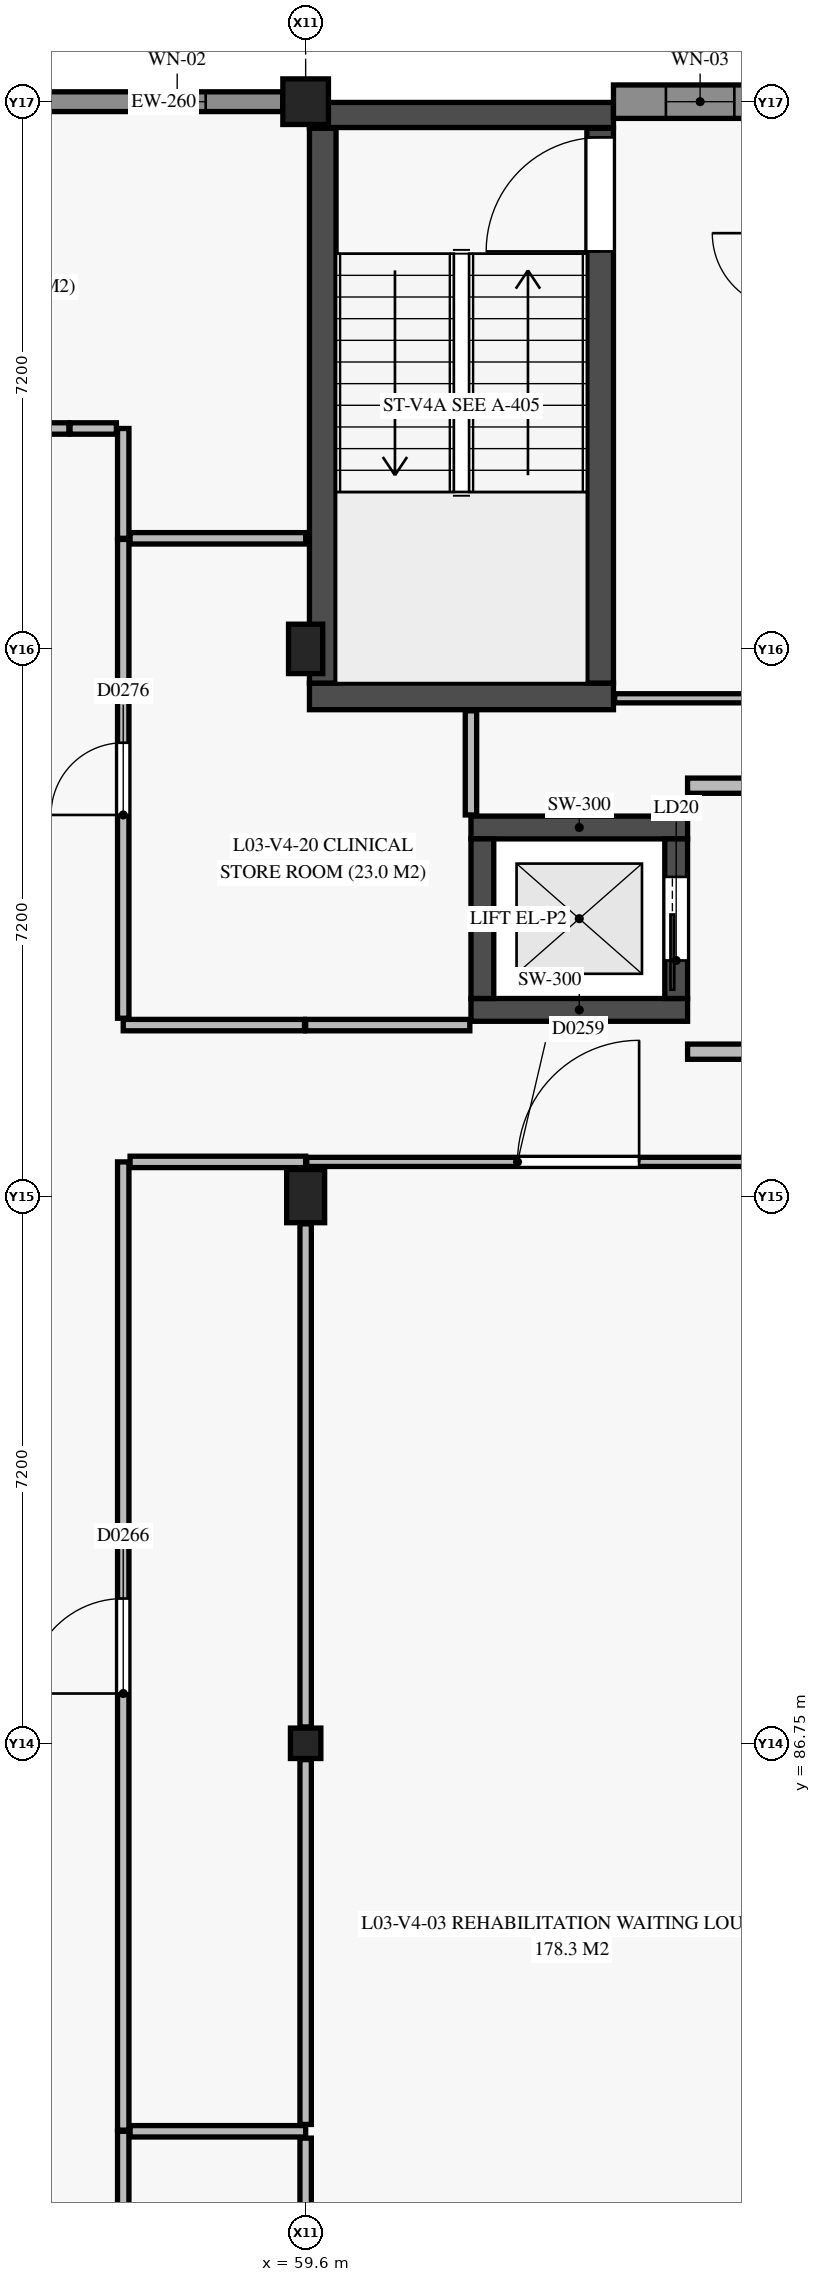
"""IFC4 building model, lengths in metres.
Left out: names, types, materials, properties, quantities, classifications, styles, units other than length and angle.
Written with IfcOpenShell. Run it as: python <this file> out.ifc"""

import sys

from ifc_helpers import new_model, si_unit, direction, frame, frame_2d, origin, origin_2d, place, context, subcontext, project, spatial, rectangle, circle, extrude, element, fill, save


model = new_model("IFC4")
c1 = context("Model", 3, precision=1e-05, world=origin(), true_north=direction((0.0, 1.0)))
c2 = subcontext(c1, "Body", "Model", "MODEL_VIEW")
j1 = project(units=[si_unit("LENGTHUNIT", "METRE"), si_unit("PLANEANGLEUNIT", "RADIAN")], contexts=[c1])
p1 = place(None, origin())
s1 = spatial("IfcSite", under=j1, at=p1, CompositionType="ELEMENT")
p2 = place(p1, origin())
s2 = spatial("IfcBuilding", under=s1, at=p2, CompositionType="ELEMENT")
p3 = place(p2, frame((0.0, 0.0, 13.2)))
s3 = spatial("IfcBuildingStorey", under=s2, at=p3, CompositionType="ELEMENT", Elevation=13.2)
p4 = place(p3, frame((59.6, 86.75, 0.0), z_axis=(0.0, 0.0, 1.0), x_axis=(1.0, 0.0, 0.0)))
e1 = element("IfcColumn", 1, at=p4, inside=s3, PredefinedType="COLUMN", context=c2, shape_type="SweptSolid", body=[
    extrude(rectangle(XDim=0.4, YDim=0.4, at=origin_2d()), origin(), (0.0, 0.0, 1.0), 4.05),
])
p5 = place(p3, frame((59.6, 93.95, 0.0), z_axis=(0.0, 0.0, 1.0), x_axis=(1.0, 0.0, 0.0)))
e2 = element("IfcColumn", 2, at=p5, inside=s3, PredefinedType="COLUMN", context=c2, shape_type="SweptSolid", body=[
    extrude(rectangle(XDim=0.5, YDim=0.7, at=origin_2d()), origin(), (0.0, 0.0, 1.0), 4.2),
])
p6 = place(p3, frame((59.6, 101.15, 0.0), z_axis=(0.0, 0.0, 1.0), x_axis=(1.0, 0.0, 0.0)))
e3 = element("IfcColumn", 3, at=p6, inside=s3, PredefinedType="COLUMN", context=c2, shape_type="SweptSolid", body=[
    extrude(rectangle(XDim=0.45, YDim=0.65, at=origin_2d()), origin(), (0.0, 0.0, 1.0), 4.2),
])
p7 = place(p3, frame((59.6, 108.35, 0.0), z_axis=(0.0, 0.0, 1.0), x_axis=(1.0, 0.0, 0.0)))
e4 = element("IfcColumn", 4, at=p7, inside=s3, PredefinedType="COLUMN", context=c2, shape_type="SweptSolid", body=[
    extrude(circle(Radius=0.3, at=origin_2d()), origin(), (0.0, 0.0, 1.0), 4.2),
])
p8 = place(p3, frame((59.65, 100.525, 0.0), z_axis=(0.0, 0.0, 1.0), x_axis=(1.0, 0.0, 0.0)))
e5 = element("IfcWall", 5, at=p8, inside=s3, PredefinedType="SHEAR", context=c2, shape_type="SweptSolid", body=[
    extrude(rectangle(XDim=4.0, YDim=0.35, at=frame_2d((2.0, 0.0))), origin(), (0.0, 0.0, 1.0), 3.95),
])
p9 = place(p3, frame((59.65, 108.175, 0.0), z_axis=(0.0, 0.0, 1.0), x_axis=(1.0, 0.0, 0.0)))
e6 = element("IfcWall", 6, at=p9, inside=s3, PredefinedType="SHEAR", context=c2, shape_type="SweptSolid", body=[
    extrude(rectangle(XDim=4.0, YDim=0.33, at=frame_2d((2.0, 0.0))), origin(), (0.0, 0.0, 1.0), 3.95),
])
p10 = place(p3, frame((59.825, 100.7, 0.0), z_axis=(0.0, 0.0, 1.0), x_axis=(0.0, 1.0, 0.0)))
e7 = element("IfcWall", 7, at=p10, inside=s3, PredefinedType="SHEAR", context=c2, shape_type="SweptSolid", body=[
    extrude(rectangle(XDim=7.3, YDim=0.35, at=frame_2d((3.65, 0.0))), origin(), (0.0, 0.0, 1.0), 3.95),
])
p11 = place(p3, frame((63.475, 100.7, 0.0), z_axis=(0.0, 0.0, 1.0), x_axis=(0.0, 1.0, 0.0)))
e8 = element("IfcWall", 8, at=p11, inside=s3, PredefinedType="SHEAR", context=c2, shape_type="SweptSolid", body=[
    extrude(rectangle(XDim=7.3, YDim=0.35, at=frame_2d((3.65, 0.0))), origin(), (0.0, 0.0, 1.0), 3.95),
])
p12 = place(p11, frame((5.68, 0.0, 0.0)))
e9 = element("IfcOpeningElement", 9, at=p12, cuts=e8, PredefinedType="OPENING", context=c2, shape_type="SweptSolid", body=[
    extrude(rectangle(XDim=1.5, YDim=2.15, at=frame_2d((0.75, 1.075))), frame((0.0, 0.185, 0.0), z_axis=(0.0, -1.0, 0.0), x_axis=(1.0, 0.0, 0.0)), (0.0, 0.0, 1.0), 0.37),
])
for number, where, z_axis, x_axis in (
    (10, (61.775, 96.4, 0.0), (0.0, 0.0, 1.0), (1.0, 0.0, 0.0)),
    (11, (61.775, 98.8, 0.0), (0.0, 0.0, 1.0), (1.0, 0.0, 0.0)),
):
    element("IfcWall", number, at=place(p3, frame(where, z_axis=z_axis, x_axis=x_axis)), inside=s3, PredefinedType="SHEAR", context=c2, shape_type="SweptSolid", body=[
        extrude(rectangle(XDim=2.85, YDim=0.3, at=frame_2d((1.425, 0.0))), origin(), (0.0, 0.0, 1.0), 3.95),
    ])
p13 = place(p3, frame((61.925, 96.55, 0.0), z_axis=(0.0, 0.0, 1.0), x_axis=(0.0, 1.0, 0.0)))
e12 = element("IfcWall", 12, at=p13, inside=s3, PredefinedType="SHEAR", context=c2, shape_type="SweptSolid", body=[
    extrude(rectangle(XDim=2.1, YDim=0.3, at=frame_2d((1.05, 0.0))), origin(), (0.0, 0.0, 1.0), 3.95),
])
p14 = place(p3, frame((64.475, 96.55, 0.0), z_axis=(0.0, 0.0, 1.0), x_axis=(0.0, 1.0, 0.0)))
e13 = element("IfcWall", 13, at=p14, inside=s3, PredefinedType="SHEAR", context=c2, shape_type="SweptSolid", body=[
    extrude(rectangle(XDim=2.1, YDim=0.3, at=frame_2d((1.05, 0.0))), origin(), (0.0, 0.0, 1.0), 3.95),
])
p15 = place(p14, frame((0.5, 0.0, 0.0)))
e14 = element("IfcOpeningElement", 14, at=p15, cuts=e13, PredefinedType="OPENING", context=c2, shape_type="SweptSolid", body=[
    extrude(rectangle(XDim=1.1, YDim=2.15, at=frame_2d((0.55, 1.075))), frame((0.0, 0.16, 0.0), z_axis=(0.0, -1.0, 0.0), x_axis=(1.0, 0.0, 0.0)), (0.0, 0.0, 1.0), 0.32),
])
p16 = place(p3, frame((56.17, 108.35, 0.0), z_axis=(0.0, 0.0, 1.0), x_axis=(1.0, 0.0, 0.0)))
e15 = element("IfcWall", 15, at=p16, inside=s3, PredefinedType="SOLIDWALL", context=c2, shape_type="SweptSolid", body=[
    extrude(rectangle(XDim=3.13, YDim=0.26, at=frame_2d((1.565, 0.0))), origin(), (0.0, 0.0, 1.0), 3.13),
])
p17 = place(p16, frame((1.365, 0.0, 0.9)))
e16 = element("IfcOpeningElement", 16, at=p17, cuts=e15, PredefinedType="OPENING", context=c2, shape_type="SweptSolid", body=[
    extrude(rectangle(XDim=0.75, YDim=1.8, at=frame_2d((0.375, 0.9))), frame((0.0, 0.14, 0.0), z_axis=(0.0, -1.0, 0.0), x_axis=(1.0, 0.0, 0.0)), (0.0, 0.0, 1.0), 0.28),
])
p18 = place(p3, frame((63.65, 108.35, 0.0), z_axis=(0.0, 0.0, 1.0), x_axis=(1.0, 0.0, 0.0)))
e17 = element("IfcWall", 17, at=p18, inside=s3, PredefinedType="USERDEFINED", context=c2, shape_type="SweptSolid", body=[
    extrude(rectangle(XDim=2.875, YDim=0.44, at=frame_2d((1.438, 0.0))), origin(), (0.0, 0.0, 1.0), 3.13),
])
p19 = place(p18, frame((0.69, 0.0, 0.9)))
e18 = element("IfcOpeningElement", 18, at=p19, cuts=e17, PredefinedType="OPENING", context=c2, shape_type="SweptSolid", body=[
    extrude(rectangle(XDim=0.9, YDim=1.8, at=frame_2d((0.45, 0.9))), frame((0.0, 0.23, 0.0), z_axis=(0.0, -1.0, 0.0), x_axis=(1.0, 0.0, 0.0)), (0.0, 0.0, 1.0), 0.46),
])
for number, where, z_axis, x_axis in (
    (19, (64.625, 95.85, 0.0), (0.0, 0.0, 1.0), (1.0, 0.0, 0.0)),
    (20, (64.625, 99.35, 0.0), (0.0, 0.0, 1.0), (1.0, 0.0, 0.0)),
):
    element("IfcWall", number, at=place(p3, frame(where, z_axis=z_axis, x_axis=x_axis)), inside=s3, PredefinedType="PARTITIONING", context=c2, shape_type="SweptSolid", body=[
        extrude(rectangle(XDim=3.285, YDim=0.2, at=frame_2d((1.643, 0.0))), origin(), (0.0, 0.0, 1.0), 3.235),
    ])
p20 = place(p3, frame((57.2, 70.2, 0.0), z_axis=(0.0, 0.0, 1.0), x_axis=(0.0, 1.0, 0.0)))
e21 = element("IfcWall", 21, at=p20, inside=s3, PredefinedType="PARTITIONING", context=c2, shape_type="SweptSolid", body=[
    extrude(rectangle(XDim=11.445, YDim=0.15, at=frame_2d((5.723, 0.0))), origin(), (0.0, 0.0, 1.0), 3.48),
])
p21 = place(p20, frame((5.248, 0.0, 0.0)))
e22 = element("IfcOpeningElement", 22, at=p21, cuts=e21, PredefinedType="OPENING", context=c2, shape_type="SweptSolid", body=[
    extrude(rectangle(XDim=0.95, YDim=2.1, at=frame_2d((0.475, 1.05))), frame((0.0, 0.085, 0.0), z_axis=(0.0, -1.0, 0.0), x_axis=(1.0, 0.0, 0.0)), (0.0, 0.0, 1.0), 0.17),
])
p22 = place(p3, frame((57.2, 81.66, 0.0), z_axis=(0.0, 0.0, 1.0), x_axis=(0.0, 1.0, 0.0)))
e23 = element("IfcWall", 23, at=p22, inside=s3, PredefinedType="PARTITIONING", context=c2, shape_type="SweptSolid", body=[
    extrude(rectangle(XDim=12.74, YDim=0.15, at=frame_2d((6.37, 0.0))), origin(), (0.0, 0.0, 1.0), 3.48),
])
p23 = place(p22, frame((5.745, 0.0, 0.0)))
e24 = element("IfcOpeningElement", 24, at=p23, cuts=e23, PredefinedType="OPENING", context=c2, shape_type="SweptSolid", body=[
    extrude(rectangle(XDim=1.25, YDim=2.15, at=frame_2d((0.625, 1.075))), frame((0.0, 0.085, 0.0), z_axis=(0.0, -1.0, 0.0), x_axis=(1.0, 0.0, 0.0)), (0.0, 0.0, 1.0), 0.17),
])
p24 = place(p3, frame((57.29, 94.4, 0.0), z_axis=(0.0, 0.0, 1.0), x_axis=(1.0, 0.0, 0.0)))
e25 = element("IfcWall", 25, at=p24, inside=s3, PredefinedType="PARTITIONING", context=c2, shape_type="SweptSolid", body=[
    extrude(rectangle(XDim=2.31, YDim=0.15, at=frame_2d((1.155, 0.0))), origin(), (0.0, 0.0, 1.0), 3.135),
])
p25 = place(p3, frame((57.2, 102.605, 0.0), z_axis=(0.0, 0.0, 1.0), x_axis=(0.0, 1.0, 0.0)))
e26 = element("IfcWall", 26, at=p25, inside=s3, PredefinedType="PARTITIONING", context=c2, shape_type="SweptSolid", body=[
    extrude(rectangle(XDim=1.445, YDim=0.15, at=frame_2d((0.723, 0.0))), origin(), (0.0, 0.0, 1.0), 3.95),
])
p26 = place(p3, frame((56.5, 104.05, 0.0), z_axis=(0.0, 0.0, 1.0), x_axis=(1.0, 0.0, 0.0)))
e27 = element("IfcWall", 27, at=p26, inside=s3, PredefinedType="PARTITIONING", context=c2, shape_type="SweptSolid", body=[
    extrude(rectangle(XDim=0.61, YDim=0.15, at=frame_2d((0.305, 0.0))), origin(), (0.0, 0.0, 1.0), 3.95),
])
p27 = place(p3, frame((54.8, 104.05, 0.0), z_axis=(0.0, 0.0, 1.0), x_axis=(1.0, 0.0, 0.0)))
e28 = element("IfcWall", 28, at=p27, inside=s3, PredefinedType="PARTITIONING", context=c2, shape_type="SweptSolid", body=[
    extrude(rectangle(XDim=1.685, YDim=0.15, at=frame_2d((0.843, 0.0))), origin(), (0.0, 0.0, 1.0), 3.515),
])
p28 = place(p3, frame((59.6, 96.2, 0.0), z_axis=(0.0, 0.0, 1.0), x_axis=(1.0, 0.0, 0.0)))
e29 = element("IfcWall", 29, at=p28, inside=s3, PredefinedType="PARTITIONING", context=c2, shape_type="SweptSolid", body=[
    extrude(rectangle(XDim=2.16, YDim=0.15, at=frame_2d((1.08, 0.0))), origin(), (0.0, 0.0, 1.0), 3.135),
])
p29 = place(p3, frame((57.2, 96.2, 0.0), z_axis=(0.0, 0.0, 1.0), x_axis=(1.0, 0.0, 0.0)))
e30 = element("IfcWall", 30, at=p29, inside=s3, PredefinedType="PARTITIONING", context=c2, shape_type="SweptSolid", body=[
    extrude(rectangle(XDim=2.385, YDim=0.15, at=frame_2d((1.192, 0.0))), origin(), (0.0, 0.0, 1.0), 3.135),
])
p30 = place(p3, frame((57.2, 96.29, 0.0), z_axis=(0.0, 0.0, 1.0), x_axis=(0.0, 1.0, 0.0)))
e31 = element("IfcWall", 31, at=p30, inside=s3, PredefinedType="PARTITIONING", context=c2, shape_type="SweptSolid", body=[
    extrude(rectangle(XDim=6.3, YDim=0.15, at=frame_2d((3.15, 0.0))), origin(), (0.0, 0.0, 1.0), 3.355),
])
p31 = place(p30, frame((2.675, 0.0, 0.0)))
e32 = element("IfcOpeningElement", 32, at=p31, cuts=e31, PredefinedType="OPENING", context=c2, shape_type="SweptSolid", body=[
    extrude(rectangle(XDim=0.95, YDim=2.1, at=frame_2d((0.475, 1.05))), frame((0.0, 0.085, 0.0), z_axis=(0.0, -1.0, 0.0), x_axis=(1.0, 0.0, 0.0)), (0.0, 0.0, 1.0), 0.17),
])
p32 = place(p3, frame((59.615, 94.4, 0.0), z_axis=(0.0, 0.0, 1.0), x_axis=(1.0, 0.0, 0.0)))
e33 = element("IfcWall", 33, at=p32, inside=s3, PredefinedType="PARTITIONING", context=c2, shape_type="SweptSolid", body=[
    extrude(rectangle(XDim=7.145, YDim=0.12, at=frame_2d((3.573, 0.0))), origin(), (0.0, 0.0, 1.0), 3.135),
])
p33 = place(p32, frame((2.772, 0.0, 0.0)))
e34 = element("IfcOpeningElement", 34, at=p33, cuts=e33, PredefinedType="OPENING", context=c2, shape_type="SweptSolid", body=[
    extrude(rectangle(XDim=1.6, YDim=2.25, at=frame_2d((0.8, 1.125))), frame((0.0, 0.07, 0.0), z_axis=(0.0, -1.0, 0.0), x_axis=(1.0, 0.0, 0.0)), (0.0, 0.0, 1.0), 0.14),
])
p34 = place(p3, frame((63.665, 100.5, 0.0), z_axis=(0.0, 0.0, 1.0), x_axis=(1.0, 0.0, 0.0)))
e35 = element("IfcWall", 35, at=p34, inside=s3, PredefinedType="PARTITIONING", context=c2, shape_type="SweptSolid", body=[
    extrude(rectangle(XDim=2.285, YDim=0.12, at=frame_2d((1.143, 0.0))), origin(), (0.0, 0.0, 1.0), 3.95),
])
p35 = place(p3, frame((57.29, 81.645, 0.0), z_axis=(0.0, 0.0, 1.0), x_axis=(1.0, 0.0, 0.0)))
e36 = element("IfcWall", 36, at=p35, inside=s3, PredefinedType="PARTITIONING", context=c2, shape_type="SweptSolid", body=[
    extrude(rectangle(XDim=2.31, YDim=0.15, at=frame_2d((1.155, 0.0))), origin(), (0.0, 0.0, 1.0), 3.95),
])
p36 = place(p3, frame((59.6, 79.79, 0.0), z_axis=(0.0, 0.0, 1.0), x_axis=(0.0, 1.0, 0.0)))
e37 = element("IfcWall", 37, at=p36, inside=s3, PredefinedType="PARTITIONING", context=c2, shape_type="SweptSolid", body=[
    extrude(rectangle(XDim=1.765, YDim=0.15, at=frame_2d((0.882, 0.0))), origin(), (0.0, 0.0, 1.0), 3.95),
])
p37 = place(p3, frame((59.6, 81.735, 0.0), z_axis=(0.0, 0.0, 1.0), x_axis=(0.0, 1.0, 0.0)))
e38 = element("IfcWall", 38, at=p37, inside=s3, PredefinedType="PARTITIONING", context=c2, shape_type="SweptSolid", body=[
    extrude(rectangle(XDim=4.8, YDim=0.15, at=frame_2d((2.4, 0.0))), origin(), (0.0, 0.0, 1.0), 3.95),
])
p38 = place(p3, frame((59.6, 86.965, 0.0), z_axis=(0.0, 0.0, 1.0), x_axis=(0.0, 1.0, 0.0)))
e39 = element("IfcWall", 39, at=p38, inside=s3, PredefinedType="PARTITIONING", context=c2, shape_type="SweptSolid", body=[
    extrude(rectangle(XDim=6.62, YDim=0.15, at=frame_2d((3.31, 0.0))), origin(), (0.0, 0.0, 1.0), 3.95),
])
p39 = place(p3, frame((57.29, 102.605, 0.0), z_axis=(0.0, 0.0, 1.0), x_axis=(1.0, 0.0, 0.0)))
e40 = element("IfcWall", 40, at=p39, inside=s3, PredefinedType="PARTITIONING", context=c2, shape_type="SweptSolid", body=[
    extrude(rectangle(XDim=2.31, YDim=0.15, at=frame_2d((1.155, 0.0))), origin(), (0.0, 0.0, 1.0), 3.235),
])
p40 = place(p3, frame((61.775, 98.965, 0.0), z_axis=(0.0, 0.0, 1.0), x_axis=(0.0, 1.0, 0.0)))
e41 = element("IfcWall", 41, at=p40, inside=s3, PredefinedType="PARTITIONING", context=c2, shape_type="SweptSolid", body=[
    extrude(rectangle(XDim=1.37, YDim=0.15, at=frame_2d((0.685, 0.0))), origin(), (0.0, 0.0, 1.0), 3.95),
])
p41 = place(p17, origin())
e42 = element("IfcWindow", 42, at=p41, inside=s3, PartitioningType="SINGLE_PANEL", PredefinedType="WINDOW", context=c2, shape_type="SweptSolid", body=[
    extrude(rectangle(XDim=0.75, YDim=1.8, at=frame_2d((0.375, 0.9))), frame((0.0, 0.03, 0.0), z_axis=(0.0, -1.0, 0.0), x_axis=(1.0, 0.0, 0.0)), (0.0, 0.0, 1.0), 0.06),
])
fill(e16, e42)
p42 = place(p19, origin())
e43 = element("IfcWindow", 43, at=p42, inside=s3, PartitioningType="SINGLE_PANEL", PredefinedType="WINDOW", context=c2, shape_type="SweptSolid", body=[
    extrude(rectangle(XDim=0.9, YDim=1.8, at=frame_2d((0.45, 0.9))), frame((0.0, 0.03, 0.0), z_axis=(0.0, -1.0, 0.0), x_axis=(1.0, 0.0, 0.0)), (0.0, 0.0, 1.0), 0.06),
])
fill(e18, e43)
p43 = place(p12, origin())
e44 = element("IfcDoor", 44, at=p43, inside=s3, OperationType="SINGLE_SWING_LEFT", PredefinedType="DOOR", context=c2, shape_type="SweptSolid", body=[
    extrude(rectangle(XDim=1.5, YDim=2.15, at=frame_2d((0.75, 1.075))), frame((0.0, 0.025, 0.0), z_axis=(0.0, -1.0, 0.0), x_axis=(1.0, 0.0, 0.0)), (0.0, 0.0, 1.0), 0.05),
])
fill(e9, e44)
p44 = place(p15, origin())
e45 = element("IfcDoor", 45, at=p44, inside=s3, OperationType="SLIDING_TO_LEFT", PredefinedType="DOOR", context=c2, shape_type="SweptSolid", body=[
    extrude(rectangle(XDim=1.1, YDim=2.15, at=frame_2d((0.55, 1.075))), frame((0.0, 0.025, 0.0), z_axis=(0.0, -1.0, 0.0), x_axis=(1.0, 0.0, 0.0)), (0.0, 0.0, 1.0), 0.05),
])
fill(e14, e45)
p45 = place(p33, origin())
e46 = element("IfcDoor", 46, at=p45, inside=s3, OperationType="SINGLE_SWING_RIGHT", PredefinedType="DOOR", context=c2, shape_type="SweptSolid", body=[
    extrude(rectangle(XDim=1.6, YDim=2.25, at=frame_2d((0.8, 1.125))), frame((0.0, 0.025, 0.0), z_axis=(0.0, -1.0, 0.0), x_axis=(1.0, 0.0, 0.0)), (0.0, 0.0, 1.0), 0.05),
])
fill(e34, e46)
p46 = place(p23, origin())
e47 = element("IfcDoor", 47, at=p46, inside=s3, OperationType="SINGLE_SWING_LEFT", PredefinedType="DOOR", context=c2, shape_type="SweptSolid", body=[
    extrude(rectangle(XDim=1.25, YDim=2.15, at=frame_2d((0.625, 1.075))), frame((0.0, 0.025, 0.0), z_axis=(0.0, -1.0, 0.0), x_axis=(1.0, 0.0, 0.0)), (0.0, 0.0, 1.0), 0.05),
])
fill(e24, e47)
p47 = place(p31, origin())
e48 = element("IfcDoor", 48, at=p47, inside=s3, OperationType="SINGLE_SWING_LEFT", PredefinedType="DOOR", context=c2, shape_type="SweptSolid", body=[
    extrude(rectangle(XDim=0.95, YDim=2.1, at=frame_2d((0.475, 1.05))), frame((0.0, 0.025, 0.0), z_axis=(0.0, -1.0, 0.0), x_axis=(1.0, 0.0, 0.0)), (0.0, 0.0, 1.0), 0.05),
])
fill(e32, e48)
save(model, sys.argv[1])
